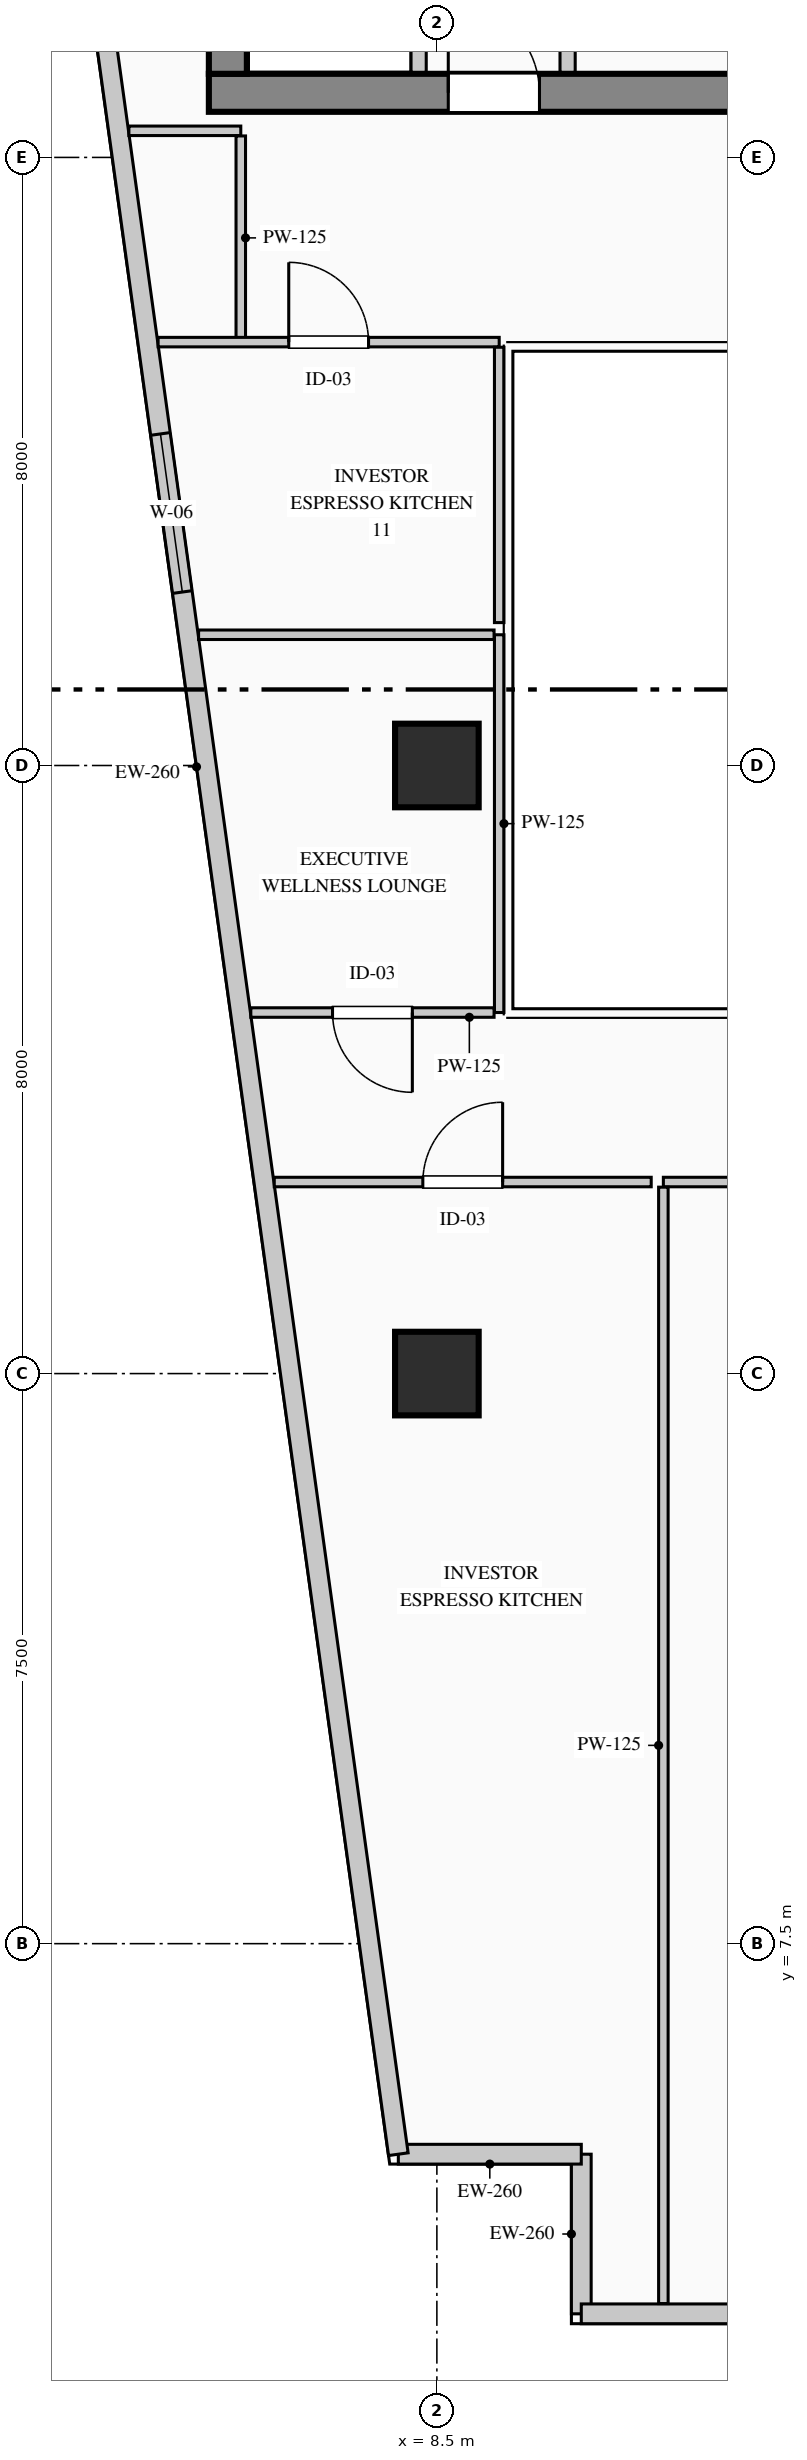
"""IFC4 building model, lengths in metres.
Left out: names, types, materials, properties, quantities, classifications, styles, units other than length and angle.
Written with IfcOpenShell. Run it as: python <this file> out.ifc"""

import sys

from ifc_helpers import new_model, si_unit, direction, frame, frame_2d, origin, origin_2d, place, context, subcontext, project, spatial, rectangle, extrude, element, fill, save


model = new_model("IFC4")
c1 = context("Model", 3, precision=1e-05, world=origin(), true_north=direction((0.0, 1.0)))
c2 = subcontext(c1, "Body", "Model", "MODEL_VIEW")
j1 = project(units=[si_unit("LENGTHUNIT", "METRE"), si_unit("PLANEANGLEUNIT", "RADIAN")], contexts=[c1])
p1 = place(None, origin())
s1 = spatial("IfcSite", under=j1, at=p1, CompositionType="ELEMENT")
p2 = place(p1, origin())
s2 = spatial("IfcBuilding", under=s1, at=p2, CompositionType="ELEMENT")
p3 = place(p2, frame((0.0, 0.0, 162.75)))
s3 = spatial("IfcBuildingStorey", under=s2, at=p3, CompositionType="ELEMENT", Elevation=162.75)
p4 = place(p3, frame((5.5, 31.85, 0.0), z_axis=(0.0, 0.0, 1.0), x_axis=(1.0, 0.0, 0.0)))
e1 = element("IfcWall", 1, at=p4, inside=s3, PredefinedType="SHEAR", context=c2, shape_type="SweptSolid", body=[
    extrude(rectangle(XDim=17.85, YDim=0.5, at=frame_2d((8.925, 0.0))), origin(), (0.0, 0.0, 1.0), 3.95),
])
p5 = place(p4, frame((3.15, 0.0, 0.0)))
e2 = element("IfcOpeningElement", 2, at=p5, cuts=e1, PredefinedType="OPENING", context=c2, shape_type="SweptSolid", body=[
    extrude(rectangle(XDim=1.2, YDim=2.2, at=frame_2d((0.6, 1.1))), frame((0.0, 0.26, 0.0), z_axis=(0.0, -1.0, 0.0), x_axis=(1.0, 0.0, 0.0)), (0.0, 0.0, 1.0), 0.52),
])
p6 = place(p4, frame((7.0, 0.0, 0.0)))
e3 = element("IfcOpeningElement", 3, at=p6, cuts=e1, PredefinedType="OPENING", context=c2, shape_type="SweptSolid", body=[
    extrude(rectangle(XDim=1.2, YDim=2.2, at=frame_2d((0.6, 1.1))), frame((0.0, 0.26, 0.0), z_axis=(0.0, -1.0, 0.0), x_axis=(1.0, 0.0, 0.0)), (0.0, 0.0, 1.0), 0.52),
])
p7 = place(p4, frame((8.85, 0.0, 0.0)))
e4 = element("IfcOpeningElement", 4, at=p7, cuts=e1, PredefinedType="OPENING", context=c2, shape_type="SweptSolid", body=[
    extrude(rectangle(XDim=1.15, YDim=2.2, at=frame_2d((0.575, 1.1))), frame((0.0, 0.26, 0.0), z_axis=(0.0, -1.0, 0.0), x_axis=(1.0, 0.0, 0.0)), (0.0, 0.0, 1.0), 0.52),
])
p8 = place(p4, frame((15.95, 0.0, 0.0)))
e5 = element("IfcOpeningElement", 5, at=p8, cuts=e1, PredefinedType="OPENING", context=c2, shape_type="SweptSolid", body=[
    extrude(rectangle(XDim=1.2, YDim=2.2, at=frame_2d((0.6, 1.1))), frame((0.0, 0.26, 0.0), z_axis=(0.0, -1.0, 0.0), x_axis=(1.0, 0.0, 0.0)), (0.0, 0.0, 1.0), 0.52),
])
p9 = place(p3, frame((5.75, 32.1, 0.0), z_axis=(0.0, 0.0, 1.0), x_axis=(0.0, 1.0, 0.0)))
e6 = element("IfcWall", 6, at=p9, inside=s3, PredefinedType="SHEAR", context=c2, shape_type="SweptSolid", body=[
    extrude(rectangle(XDim=8.3, YDim=0.5, at=frame_2d((4.15, 0.0))), origin(), (0.0, 0.0, 1.0), 3.95),
])
for number, where, z_axis, x_axis in (
    (7, (8.5, 15.0, 0.0), (0.0, 0.0, 1.0), (1.0, 0.0, 0.0)),
    (8, (8.5, 23.0, 0.0), (0.0, 0.0, 1.0), (1.0, 0.0, 0.0)),
):
    element("IfcColumn", number, at=place(p3, frame(where, z_axis=z_axis, x_axis=x_axis)), inside=s3, PredefinedType="COLUMN", context=c2, shape_type="SweptSolid", body=[
        extrude(rectangle(XDim=1.1, YDim=1.1, at=origin_2d()), origin(), (0.0, 0.0, 1.0), 3.95),
    ])
p10 = place(p3, frame((10.4, 2.63, 0.0), z_axis=(0.0, 0.0, 1.0), x_axis=(0.0, 1.0, 0.0)))
e9 = element("IfcWall", 9, at=p10, inside=s3, PredefinedType="STANDARD", context=c2, shape_type="SweptSolid", body=[
    extrude(rectangle(XDim=2.1, YDim=0.26, at=frame_2d((1.05, 0.0))), origin(), (0.0, 0.0, 1.0), 3.69),
])
p11 = place(p3, frame((10.4, 4.73, 0.0), z_axis=(0.0, 0.0, 1.0), x_axis=(-1.0, 0.0, 0.0)))
e10 = element("IfcWall", 10, at=p11, inside=s3, PredefinedType="STANDARD", context=c2, shape_type="SweptSolid", body=[
    extrude(rectangle(XDim=2.407, YDim=0.26, at=frame_2d((1.204, 0.0))), origin(), (0.0, 0.0, 1.0), 3.69),
])
p12 = place(p3, frame((7.993, 4.73, 0.0), z_axis=(0.0, 0.0, 1.0), x_axis=(-0.136989009016, 0.990572567462, 0.0)))
e11 = element("IfcWall", 11, at=p12, inside=s3, PredefinedType="STANDARD", context=c2, shape_type="SweptSolid", body=[
    extrude(rectangle(XDim=36.888, YDim=0.26, at=frame_2d((18.444, 0.0))), origin(), (0.0, 0.0, 1.0), 3.69),
])
p13 = place(p12, frame((20.748, 0.0, 0.9)))
e12 = element("IfcOpeningElement", 12, at=p13, cuts=e11, PredefinedType="OPENING", context=c2, shape_type="SweptSolid", body=[
    extrude(rectangle(XDim=2.1, YDim=2.0, at=frame_2d((1.05, 1.0))), frame((0.0, 0.14, 0.0), z_axis=(0.0, -1.0, 0.0), x_axis=(1.0, 0.0, 0.0)), (0.0, 0.0, 1.0), 0.28),
])
p14 = place(p3, frame((24.11, 2.63, 0.0), z_axis=(0.0, 0.0, 1.0), x_axis=(-1.0, 0.0, 0.0)))
e13 = element("IfcWall", 13, at=p14, inside=s3, PredefinedType="STANDARD", context=c2, shape_type="SweptSolid", body=[
    extrude(rectangle(XDim=13.71, YDim=0.26, at=frame_2d((6.855, 0.0))), origin(), (0.0, 0.0, 1.0), 3.69),
])
p15 = place(p14, frame((7.724, 0.0, 0.9)))
e14 = element("IfcOpeningElement", 14, at=p15, cuts=e13, PredefinedType="OPENING", context=c2, shape_type="SweptSolid", body=[
    extrude(rectangle(XDim=2.1, YDim=2.0, at=frame_2d((1.05, 1.0))), frame((0.0, 0.14, 0.0), z_axis=(0.0, -1.0, 0.0), x_axis=(1.0, 0.0, 0.0)), (0.0, 0.0, 1.0), 0.28),
])
p16 = place(p3, frame((8.26, 32.12, 0.0), z_axis=(0.0, 0.0, 1.0), x_axis=(0.0, 1.0, 0.0)))
e15 = element("IfcWall", 15, at=p16, inside=s3, PredefinedType="PARTITIONING", context=c2, shape_type="SweptSolid", body=[
    extrude(rectangle(XDim=7.5, YDim=0.2, at=frame_2d((3.75, 0.0))), origin(), (0.0, 0.0, 1.0), 3.69),
])
p17 = place(p3, frame((10.22, 32.12, 0.0), z_axis=(0.0, 0.0, 1.0), x_axis=(0.0, 1.0, 0.0)))
e16 = element("IfcWall", 16, at=p17, inside=s3, PredefinedType="PARTITIONING", context=c2, shape_type="SweptSolid", body=[
    extrude(rectangle(XDim=8.26, YDim=0.2, at=frame_2d((4.13, 0.0))), origin(), (0.0, 0.0, 1.0), 3.69),
])
p18 = place(p3, frame((11.48, 17.52, 0.0), z_axis=(0.0, 0.0, 1.0), x_axis=(1.0, 0.0, 0.0)))
e17 = element("IfcWall", 17, at=p18, inside=s3, PredefinedType="PARTITIONING", context=c2, shape_type="SweptSolid", body=[
    extrude(rectangle(XDim=9.24, YDim=0.125, at=frame_2d((4.62, 0.0))), origin(), (0.0, 0.0, 1.0), 3.69),
])
p19 = place(p18, frame((4.095, 0.0, 0.0)))
e18 = element("IfcOpeningElement", 18, at=p19, cuts=e17, PredefinedType="OPENING", context=c2, shape_type="SweptSolid", body=[
    extrude(rectangle(XDim=1.05, YDim=2.15, at=frame_2d((0.525, 1.075))), frame((0.0, 0.073, 0.0), z_axis=(0.0, -1.0, 0.0), x_axis=(1.0, 0.0, 0.0)), (0.0, 0.0, 1.0), 0.145),
])
p20 = place(p3, frame((11.48, 2.765, 0.0), z_axis=(0.0, 0.0, 1.0), x_axis=(0.0, 1.0, 0.0)))
e19 = element("IfcWall", 19, at=p20, inside=s3, PredefinedType="PARTITIONING", context=c2, shape_type="SweptSolid", body=[
    extrude(rectangle(XDim=14.688, YDim=0.125, at=frame_2d((7.344, 0.0))), origin(), (0.0, 0.0, 1.0), 3.69),
])
p21 = place(p3, frame((6.36, 17.52, 0.0), z_axis=(0.0, 0.0, 1.0), x_axis=(1.0, 0.0, 0.0)))
e20 = element("IfcWall", 20, at=p21, inside=s3, PredefinedType="PARTITIONING", context=c2, shape_type="SweptSolid", body=[
    extrude(rectangle(XDim=4.96, YDim=0.125, at=frame_2d((2.48, 0.0))), origin(), (0.0, 0.0, 1.0), 3.69),
])
p22 = place(p21, frame((1.955, 0.0, 0.0)))
e21 = element("IfcOpeningElement", 21, at=p22, cuts=e20, PredefinedType="OPENING", context=c2, shape_type="SweptSolid", body=[
    extrude(rectangle(XDim=1.05, YDim=2.15, at=frame_2d((0.525, 1.075))), frame((0.0, 0.073, 0.0), z_axis=(0.0, -1.0, 0.0), x_axis=(1.0, 0.0, 0.0)), (0.0, 0.0, 1.0), 0.145),
])
p23 = place(p3, frame((9.32, 24.72, 0.0), z_axis=(0.0, 0.0, 1.0), x_axis=(0.0, -1.0, 0.0)))
e22 = element("IfcWall", 22, at=p23, inside=s3, PredefinedType="PARTITIONING", context=c2, shape_type="SweptSolid", body=[
    extrude(rectangle(XDim=4.97, YDim=0.125, at=frame_2d((2.485, 0.0))), origin(), (0.0, 0.0, 1.0), 3.375),
])
p24 = place(p3, frame((9.252, 19.75, 0.0), z_axis=(0.0, 0.0, 1.0), x_axis=(-1.0, 0.0, 0.0)))
e23 = element("IfcWall", 23, at=p24, inside=s3, PredefinedType="PARTITIONING", context=c2, shape_type="SweptSolid", body=[
    extrude(rectangle(XDim=3.2, YDim=0.125, at=frame_2d((1.6, 0.0))), origin(), (0.0, 0.0, 1.0), 3.69),
])
p25 = place(p24, frame((1.075, 0.0, 0.0)))
e24 = element("IfcOpeningElement", 24, at=p25, cuts=e23, PredefinedType="OPENING", context=c2, shape_type="SweptSolid", body=[
    extrude(rectangle(XDim=1.05, YDim=2.15, at=frame_2d((0.525, 1.075))), frame((0.0, 0.073, 0.0), z_axis=(0.0, -1.0, 0.0), x_axis=(1.0, 0.0, 0.0)), (0.0, 0.0, 1.0), 0.145),
])
p26 = place(p3, frame((5.365, 24.72, 0.0), z_axis=(0.0, 0.0, 1.0), x_axis=(1.0, 0.0, 0.0)))
e25 = element("IfcWall", 25, at=p26, inside=s3, PredefinedType="PARTITIONING", context=c2, shape_type="SweptSolid", body=[
    extrude(rectangle(XDim=3.888, YDim=0.125, at=frame_2d((1.944, 0.0))), origin(), (0.0, 0.0, 1.0), 3.69),
])
p27 = place(p3, frame((4.448, 31.35, 0.0), z_axis=(0.0, 0.0, 1.0), x_axis=(1.0, 0.0, 0.0)))
e26 = element("IfcWall", 26, at=p27, inside=s3, PredefinedType="PARTITIONING", context=c2, shape_type="SweptSolid", body=[
    extrude(rectangle(XDim=1.472, YDim=0.125, at=frame_2d((0.736, 0.0))), origin(), (0.0, 0.0, 1.0), 3.69),
])
p28 = place(p3, frame((5.92, 31.282, 0.0), z_axis=(0.0, 0.0, 1.0), x_axis=(0.0, -1.0, 0.0)))
e27 = element("IfcWall", 27, at=p28, inside=s3, PredefinedType="PARTITIONING", context=c2, shape_type="SweptSolid", body=[
    extrude(rectangle(XDim=2.682, YDim=0.125, at=frame_2d((1.341, 0.0))), origin(), (0.0, 0.0, 1.0), 3.69),
])
p29 = place(p3, frame((4.832, 28.57, 0.0), z_axis=(0.0, 0.0, 1.0), x_axis=(1.0, 0.0, 0.0)))
e28 = element("IfcWall", 28, at=p29, inside=s3, PredefinedType="PARTITIONING", context=c2, shape_type="SweptSolid", body=[
    extrude(rectangle(XDim=4.488, YDim=0.125, at=frame_2d((2.244, 0.0))), origin(), (0.0, 0.0, 1.0), 3.69),
])
p30 = place(p29, frame((1.719, 0.0, 0.0)))
e29 = element("IfcOpeningElement", 29, at=p30, cuts=e28, PredefinedType="OPENING", context=c2, shape_type="SweptSolid", body=[
    extrude(rectangle(XDim=1.05, YDim=2.15, at=frame_2d((0.525, 1.075))), frame((0.0, 0.073, 0.0), z_axis=(0.0, -1.0, 0.0), x_axis=(1.0, 0.0, 0.0)), (0.0, 0.0, 1.0), 0.145),
])
p31 = place(p3, frame((9.32, 28.502, 0.0), z_axis=(0.0, 0.0, 1.0), x_axis=(0.0, -1.0, 0.0)))
e30 = element("IfcWall", 30, at=p31, inside=s3, PredefinedType="PARTITIONING", context=c2, shape_type="SweptSolid", body=[
    extrude(rectangle(XDim=3.623, YDim=0.125, at=frame_2d((1.811, 0.0))), origin(), (0.0, 0.0, 1.0), 3.375),
])
p32 = place(p13, origin())
e31 = element("IfcWindow", 31, at=p32, inside=s3, PartitioningType="DOUBLE_PANEL_VERTICAL", PredefinedType="WINDOW", context=c2, shape_type="SweptSolid", body=[
    extrude(rectangle(XDim=2.1, YDim=2.0, at=frame_2d((1.05, 1.0))), frame((0.0, 0.03, 0.0), z_axis=(0.0, -1.0, 0.0), x_axis=(1.0, 0.0, 0.0)), (0.0, 0.0, 1.0), 0.06),
])
fill(e12, e31)
p33 = place(p5, origin())
e32 = element("IfcDoor", 32, at=p33, inside=s3, OperationType="SINGLE_SWING_LEFT", PredefinedType="DOOR", context=c2, shape_type="SweptSolid", body=[
    extrude(rectangle(XDim=1.2, YDim=2.2, at=frame_2d((0.6, 1.1))), frame((0.0, 0.025, 0.0), z_axis=(0.0, -1.0, 0.0), x_axis=(1.0, 0.0, 0.0)), (0.0, 0.0, 1.0), 0.05),
])
fill(e2, e32)
p34 = place(p22, origin())
e33 = element("IfcDoor", 33, at=p34, inside=s3, OperationType="SINGLE_SWING_RIGHT", PredefinedType="DOOR", context=c2, shape_type="SweptSolid", body=[
    extrude(rectangle(XDim=1.05, YDim=2.15, at=frame_2d((0.525, 1.075))), frame((0.0, 0.025, 0.0), z_axis=(0.0, -1.0, 0.0), x_axis=(1.0, 0.0, 0.0)), (0.0, 0.0, 1.0), 0.05),
])
fill(e21, e33)
p35 = place(p25, origin())
e34 = element("IfcDoor", 34, at=p35, inside=s3, OperationType="SINGLE_SWING_LEFT", PredefinedType="DOOR", context=c2, shape_type="SweptSolid", body=[
    extrude(rectangle(XDim=1.05, YDim=2.15, at=frame_2d((0.525, 1.075))), frame((0.0, 0.025, 0.0), z_axis=(0.0, -1.0, 0.0), x_axis=(1.0, 0.0, 0.0)), (0.0, 0.0, 1.0), 0.05),
])
fill(e24, e34)
p36 = place(p30, origin())
e35 = element("IfcDoor", 35, at=p36, inside=s3, OperationType="SINGLE_SWING_LEFT", PredefinedType="DOOR", context=c2, shape_type="SweptSolid", body=[
    extrude(rectangle(XDim=1.05, YDim=2.15, at=frame_2d((0.525, 1.075))), frame((0.0, 0.025, 0.0), z_axis=(0.0, -1.0, 0.0), x_axis=(1.0, 0.0, 0.0)), (0.0, 0.0, 1.0), 0.05),
])
fill(e29, e35)
save(model, sys.argv[1])
